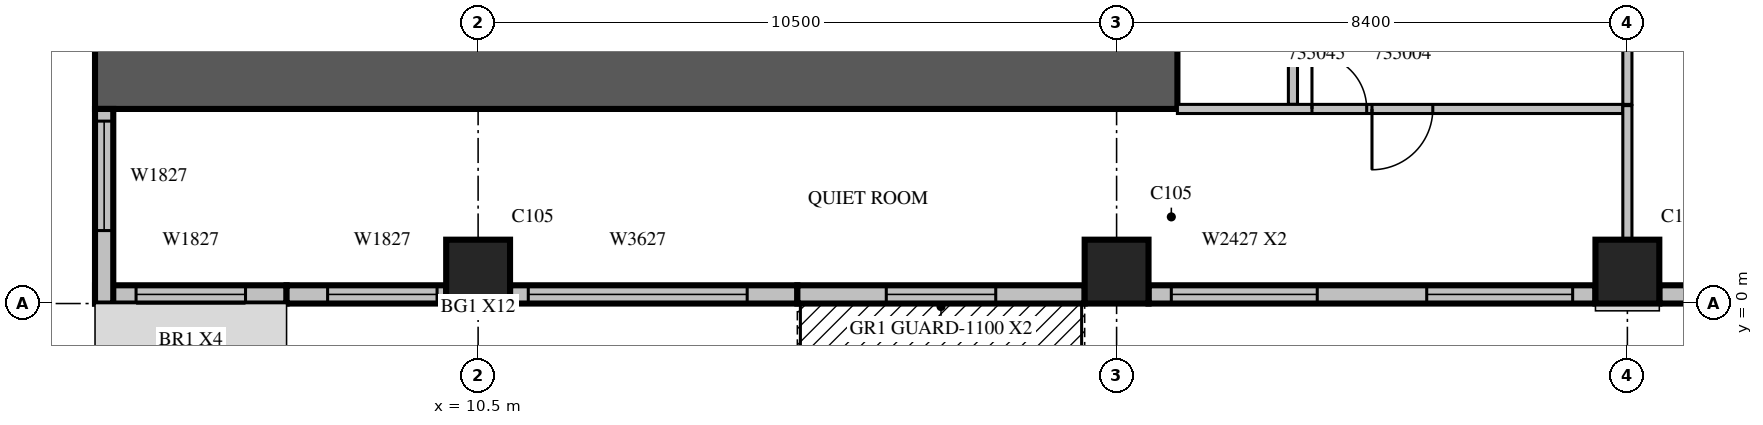
"""IFC4 building model, lengths in metres.
Left out: names, types, materials, properties, quantities, classifications, styles, units other than length and angle.
Written with IfcOpenShell. Run it as: python <this file> out.ifc"""

import sys

from ifc_helpers import new_model, si_unit, direction, frame, frame_2d, origin, origin_2d, place, context, subcontext, project, spatial, rectangle, extrude, source, transform, mapped, element, fill, save


model = new_model("IFC4")
c1 = context("Model", 3, precision=1e-05, world=origin(), true_north=direction((0.0, 1.0)))
c2 = subcontext(c1, "Body", "Model", "MODEL_VIEW")
j1 = project(units=[si_unit("LENGTHUNIT", "METRE"), si_unit("PLANEANGLEUNIT", "RADIAN")], contexts=[c1])
p1 = place(None, origin())
s1 = spatial("IfcSite", under=j1, at=p1, CompositionType="ELEMENT")
p2 = place(p1, origin())
s2 = spatial("IfcBuilding", under=s1, at=p2, CompositionType="ELEMENT")
p3 = place(p2, frame((0.0, 0.0, 158.1)))
s3 = spatial("IfcBuildingStorey", under=s2, at=p3, CompositionType="ELEMENT", Elevation=158.1)
m1 = source(origin(), c2, "Body", "SweptSolid", [
    extrude(rectangle(XDim=1.05, YDim=1.05, at=origin_2d()), origin(), (0.0, 0.0, 1.0), 4.2),
])
for number, where, z_axis, x_axis in (
    (1, (10.5, 0.525, 0.0), (0.0, 0.0, 1.0), (1.0, 0.0, 0.0)),
    (2, (21.0, 0.525, 0.0), (0.0, 0.0, 1.0), (1.0, 0.0, 0.0)),
    (3, (29.4, 0.525, 0.0), (0.0, 0.0, 1.0), (1.0, 0.0, 0.0)),
):
    element("IfcColumn", number, at=place(p3, frame(where, z_axis=z_axis, x_axis=x_axis)), inside=s3, PredefinedType="COLUMN", context=c2, shape_type="MappedRepresentation", body=[
        mapped(m1, transform((0.0, 0.0, 0.0), scale=1.0)),
    ])
m2 = source(origin(), c2, "Body", "SweptSolid", [
    extrude(rectangle(XDim=17.8, YDim=1.0, at=frame_2d((8.9, 0.0))), origin(), (0.0, 0.0, 1.0), 4.2),
])
p4 = place(p3, frame((4.2, 3.7, 0.0), z_axis=(0.0, 0.0, 1.0), x_axis=(1.0, 0.0, 0.0)))
e4 = element("IfcWall", 4, at=p4, inside=s3, PredefinedType="SHEAR", context=c2, shape_type="MappedRepresentation", body=[
    mapped(m2, transform((0.0, 0.0, 0.0), scale=1.0)),
])
m3 = source(origin(), c2, "Body", "SweptSolid", [
    extrude(rectangle(XDim=3.15, YDim=0.3, at=frame_2d((1.575, 0.0))), origin(), (0.0, 0.0, 1.0), 3.8),
])
p5 = place(p3, frame((4.2, 0.15, 0.0), z_axis=(0.0, 0.0, 1.0), x_axis=(1.0, 0.0, 0.0)))
e5 = element("IfcWall", 5, at=p5, inside=s3, PredefinedType="STANDARD", context=c2, shape_type="MappedRepresentation", body=[
    mapped(m3, transform((0.0, 0.0, 0.0), scale=1.0)),
])
m4 = source(origin(), c2, "Body", "SweptSolid", [
    extrude(rectangle(XDim=1.8, YDim=2.7, at=frame_2d((0.9, 1.35))), frame((0.0, 0.16, 0.0), z_axis=(0.0, -1.0, 0.0), x_axis=(1.0, 0.0, 0.0)), (0.0, 0.0, 1.0), 0.32),
])
p6 = place(p5, frame((0.675, 0.0, 0.6)))
e6 = element("IfcOpeningElement", 6, at=p6, cuts=e5, PredefinedType="OPENING", context=c2, shape_type="MappedRepresentation", body=[
    mapped(m4, transform((0.0, 0.0, 0.0), scale=1.0)),
])
m5 = source(origin(), c2, "Body", "SweptSolid", [
    extrude(rectangle(XDim=2.625, YDim=0.3, at=frame_2d((1.312, 0.0))), origin(), (0.0, 0.0, 1.0), 3.8),
])
p7 = place(p3, frame((7.35, 0.15, 0.0), z_axis=(0.0, 0.0, 1.0), x_axis=(1.0, 0.0, 0.0)))
e7 = element("IfcWall", 7, at=p7, inside=s3, PredefinedType="STANDARD", context=c2, shape_type="MappedRepresentation", body=[
    mapped(m5, transform((0.0, 0.0, 0.0), scale=1.0)),
])
p8 = place(p7, frame((0.675, 0.0, 0.6)))
e8 = element("IfcOpeningElement", 8, at=p8, cuts=e7, PredefinedType="OPENING", context=c2, shape_type="MappedRepresentation", body=[
    mapped(m4, transform((0.0, 0.0, 0.0), scale=1.0)),
])
m6 = source(origin(), c2, "Body", "SweptSolid", [
    extrude(rectangle(XDim=4.725, YDim=0.3, at=frame_2d((2.362, 0.0))), origin(), (0.0, 0.0, 1.0), 3.8),
])
p9 = place(p3, frame((11.025, 0.15, 0.0), z_axis=(0.0, 0.0, 1.0), x_axis=(1.0, 0.0, 0.0)))
e9 = element("IfcWall", 9, at=p9, inside=s3, PredefinedType="STANDARD", context=c2, shape_type="MappedRepresentation", body=[
    mapped(m6, transform((0.0, 0.0, 0.0), scale=1.0)),
])
m7 = source(origin(), c2, "Body", "SweptSolid", [
    extrude(rectangle(XDim=3.6, YDim=2.7, at=frame_2d((1.8, 1.35))), frame((0.0, 0.16, 0.0), z_axis=(0.0, -1.0, 0.0), x_axis=(1.0, 0.0, 0.0)), (0.0, 0.0, 1.0), 0.32),
])
p10 = place(p9, frame((0.3, 0.0, 0.6)))
e10 = element("IfcOpeningElement", 10, at=p10, cuts=e9, PredefinedType="OPENING", context=c2, shape_type="MappedRepresentation", body=[
    mapped(m7, transform((0.0, 0.0, 0.0), scale=1.0)),
])
p11 = place(p3, frame((15.75, 0.15, 0.0), z_axis=(0.0, 0.0, 1.0), x_axis=(1.0, 0.0, 0.0)))
e11 = element("IfcWall", 11, at=p11, inside=s3, PredefinedType="STANDARD", context=c2, shape_type="MappedRepresentation", body=[
    mapped(m6, transform((0.0, 0.0, 0.0), scale=1.0)),
])
m8 = source(origin(), c2, "Body", "SweptSolid", [
    extrude(rectangle(XDim=1.8, YDim=2.4, at=frame_2d((0.9, 1.2))), frame((0.0, 0.16, 0.0), z_axis=(0.0, -1.0, 0.0), x_axis=(1.0, 0.0, 0.0)), (0.0, 0.0, 1.0), 0.32),
])
p12 = place(p11, frame((1.462, 0.0, 0.0)))
e12 = element("IfcOpeningElement", 12, at=p12, cuts=e11, PredefinedType="OPENING", context=c2, shape_type="MappedRepresentation", body=[
    mapped(m8, transform((0.0, 0.0, 0.0), scale=1.0)),
])
m9 = source(origin(), c2, "Body", "SweptSolid", [
    extrude(rectangle(XDim=7.35, YDim=0.3, at=frame_2d((3.675, 0.0))), origin(), (0.0, 0.0, 1.0), 3.8),
])
p13 = place(p3, frame((21.525, 0.15, 0.0), z_axis=(0.0, 0.0, 1.0), x_axis=(1.0, 0.0, 0.0)))
e13 = element("IfcWall", 13, at=p13, inside=s3, PredefinedType="STANDARD", context=c2, shape_type="MappedRepresentation", body=[
    mapped(m9, transform((0.0, 0.0, 0.0), scale=1.0)),
])
m10 = source(origin(), c2, "Body", "SweptSolid", [
    extrude(rectangle(XDim=2.4, YDim=2.7, at=frame_2d((1.2, 1.35))), frame((0.0, 0.16, 0.0), z_axis=(0.0, -1.0, 0.0), x_axis=(1.0, 0.0, 0.0)), (0.0, 0.0, 1.0), 0.32),
])
p14 = place(p13, frame((0.375, 0.0, 0.6)))
e14 = element("IfcOpeningElement", 14, at=p14, cuts=e13, PredefinedType="OPENING", context=c2, shape_type="MappedRepresentation", body=[
    mapped(m10, transform((0.0, 0.0, 0.0), scale=1.0)),
])
p15 = place(p13, frame((4.575, 0.0, 0.6)))
e15 = element("IfcOpeningElement", 15, at=p15, cuts=e13, PredefinedType="OPENING", context=c2, shape_type="MappedRepresentation", body=[
    mapped(m10, transform((0.0, 0.0, 0.0), scale=1.0)),
])
p16 = place(p3, frame((29.925, 0.15, 0.0), z_axis=(0.0, 0.0, 1.0), x_axis=(1.0, 0.0, 0.0)))
e16 = element("IfcWall", 16, at=p16, inside=s3, PredefinedType="STANDARD", context=c2, shape_type="MappedRepresentation", body=[
    mapped(m9, transform((0.0, 0.0, 0.0), scale=1.0)),
])
p17 = place(p16, frame((2.575, 0.0, 0.6)))
e17 = element("IfcOpeningElement", 17, at=p17, cuts=e16, PredefinedType="OPENING", context=c2, shape_type="MappedRepresentation", body=[
    mapped(m10, transform((0.0, 0.0, 0.0), scale=1.0)),
])
m11 = source(origin(), c2, "Body", "SweptSolid", [
    extrude(rectangle(XDim=3.2, YDim=0.3, at=frame_2d((1.6, 0.0))), origin(), (0.0, 0.0, 1.0), 3.8),
])
p18 = place(p3, frame((4.35, 3.2, 0.0), z_axis=(0.0, 0.0, 1.0), x_axis=(0.0, -1.0, 0.0)))
e18 = element("IfcWall", 18, at=p18, inside=s3, PredefinedType="STANDARD", context=c2, shape_type="MappedRepresentation", body=[
    mapped(m11, transform((0.0, 0.0, 0.0), scale=1.0)),
])
p19 = place(p18, frame((0.2, 0.0, 0.6)))
e19 = element("IfcOpeningElement", 19, at=p19, cuts=e18, PredefinedType="OPENING", context=c2, shape_type="MappedRepresentation", body=[
    mapped(m4, transform((0.0, 0.0, 0.0), scale=1.0)),
])
m12 = source(origin(), c2, "Body", "SweptSolid", [
    extrude(rectangle(XDim=11.425, YDim=0.15, at=frame_2d((5.713, 0.0))), origin(), (0.0, 0.0, 1.0), 3.8),
])
p20 = place(p3, frame((23.9, 14.7, 0.0), z_axis=(0.0, 0.0, 1.0), x_axis=(0.0, -1.0, 0.0)))
e20 = element("IfcWall", 20, at=p20, inside=s3, PredefinedType="PARTITIONING", context=c2, shape_type="MappedRepresentation", body=[
    mapped(m12, transform((0.0, 0.0, 0.0), scale=1.0)),
])
m13 = source(origin(), c2, "Body", "SweptSolid", [
    extrude(rectangle(XDim=0.9, YDim=2.1, at=frame_2d((0.45, 1.05))), frame((0.0, 0.085, 0.0), z_axis=(0.0, -1.0, 0.0), x_axis=(1.0, 0.0, 0.0)), (0.0, 0.0, 1.0), 0.17),
])
p21 = place(p20, frame((7.963, 0.0, 0.0)))
e21 = element("IfcOpeningElement", 21, at=p21, cuts=e20, PredefinedType="OPENING", context=c2, shape_type="MappedRepresentation", body=[
    mapped(m13, transform((0.0, 0.0, 0.0), scale=1.0)),
])
p22 = place(p20, frame((1.375, 0.0, 0.0)))
e22 = element("IfcOpeningElement", 22, at=p22, cuts=e20, PredefinedType="OPENING", context=c2, shape_type="MappedRepresentation", body=[
    mapped(m13, transform((0.0, 0.0, 0.0), scale=1.0)),
])
m14 = source(origin(), c2, "Body", "SweptSolid", [
    extrude(rectangle(XDim=6.701, YDim=0.15, at=frame_2d((3.35, 0.0))), origin(), (0.0, 0.0, 1.0), 3.8),
])
p23 = place(p3, frame((29.4, 3.275, 0.0), z_axis=(0.0, 0.0, 1.0), x_axis=(0.0, 1.0, 0.0)))
e23 = element("IfcWall", 23, at=p23, inside=s3, PredefinedType="PARTITIONING", context=c2, shape_type="MappedRepresentation", body=[
    mapped(m14, transform((0.0, 0.0, 0.0), scale=1.0)),
])
m15 = source(origin(), c2, "Body", "SweptSolid", [
    extrude(rectangle(XDim=7.325, YDim=0.15, at=frame_2d((3.663, 0.0))), origin(), (0.0, 0.0, 1.0), 3.8),
])
p24 = place(p3, frame((22.0, 3.2, 0.0), z_axis=(0.0, 0.0, 1.0), x_axis=(1.0, 0.0, 0.0)))
e24 = element("IfcWall", 24, at=p24, inside=s3, PredefinedType="PARTITIONING", context=c2, shape_type="MappedRepresentation", body=[
    mapped(m15, transform((0.0, 0.0, 0.0), scale=1.0)),
])
m16 = source(origin(), c2, "Body", "SweptSolid", [
    extrude(rectangle(XDim=1.0, YDim=2.1, at=frame_2d((0.5, 1.05))), frame((0.0, 0.085, 0.0), z_axis=(0.0, -1.0, 0.0), x_axis=(1.0, 0.0, 0.0)), (0.0, 0.0, 1.0), 0.17),
])
p25 = place(p24, frame((3.2, 0.0, 0.0)))
e25 = element("IfcOpeningElement", 25, at=p25, cuts=e24, PredefinedType="OPENING", context=c2, shape_type="MappedRepresentation", body=[
    mapped(m16, transform((0.0, 0.0, 0.0), scale=1.0)),
])
p26 = place(p24, frame((2.213, 0.0, 0.0)))
e26 = element("IfcOpeningElement", 26, at=p26, cuts=e24, PredefinedType="OPENING", context=c2, shape_type="MappedRepresentation", body=[
    mapped(m13, transform((0.0, 0.0, 0.0), scale=1.0)),
])
m17 = source(origin(), c2, "Body", "SweptSolid", [
    extrude(rectangle(XDim=2.206, YDim=0.15, at=frame_2d((1.103, 0.0))), origin(), (0.0, 0.0, 1.0), 3.8),
])
p27 = place(p3, frame((29.4, 1.049, 0.0), z_axis=(0.0, 0.0, 1.0), x_axis=(0.0, 1.0, 0.0)))
e27 = element("IfcWall", 27, at=p27, inside=s3, PredefinedType="PARTITIONING", context=c2, shape_type="MappedRepresentation", body=[
    mapped(m17, transform((0.0, 0.0, 0.0), scale=1.0)),
])
m18 = source(origin(), c2, "Body", "SweptSolid", [
    extrude(rectangle(XDim=1.8, YDim=2.7, at=frame_2d((0.9, 1.35))), frame((0.0, 0.03, 0.0), z_axis=(0.0, -1.0, 0.0), x_axis=(1.0, 0.0, 0.0)), (0.0, 0.0, 1.0), 0.06),
])
p28 = place(p6, origin())
e28 = element("IfcWindow", 28, at=p28, inside=s3, PartitioningType="SINGLE_PANEL", PredefinedType="WINDOW", context=c2, shape_type="MappedRepresentation", body=[
    mapped(m18, transform((0.0, 0.0, 0.0), scale=1.0)),
])
fill(e6, e28)
p29 = place(p8, origin())
e29 = element("IfcWindow", 29, at=p29, inside=s3, PartitioningType="SINGLE_PANEL", PredefinedType="WINDOW", context=c2, shape_type="MappedRepresentation", body=[
    mapped(m18, transform((0.0, 0.0, 0.0), scale=1.0)),
])
fill(e8, e29)
m19 = source(origin(), c2, "Body", "SweptSolid", [
    extrude(rectangle(XDim=3.6, YDim=2.7, at=frame_2d((1.8, 1.35))), frame((0.0, 0.03, 0.0), z_axis=(0.0, -1.0, 0.0), x_axis=(1.0, 0.0, 0.0)), (0.0, 0.0, 1.0), 0.06),
])
p30 = place(p10, origin())
e30 = element("IfcWindow", 30, at=p30, inside=s3, PartitioningType="SINGLE_PANEL", PredefinedType="WINDOW", context=c2, shape_type="MappedRepresentation", body=[
    mapped(m19, transform((0.0, 0.0, 0.0), scale=1.0)),
])
fill(e10, e30)
m20 = source(origin(), c2, "Body", "SweptSolid", [
    extrude(rectangle(XDim=1.8, YDim=2.4, at=frame_2d((0.9, 1.2))), frame((0.0, 0.025, 0.0), z_axis=(0.0, -1.0, 0.0), x_axis=(1.0, 0.0, 0.0)), (0.0, 0.0, 1.0), 0.05),
])
p31 = place(p12, origin())
e31 = element("IfcDoor", 31, at=p31, inside=s3, OperationType="SLIDING_TO_LEFT", PredefinedType="DOOR", context=c2, shape_type="MappedRepresentation", body=[
    mapped(m20, transform((0.0, 0.0, 0.0), scale=1.0)),
])
fill(e12, e31)
m21 = source(origin(), c2, "Body", "SweptSolid", [
    extrude(rectangle(XDim=2.4, YDim=2.7, at=frame_2d((1.2, 1.35))), frame((0.0, 0.03, 0.0), z_axis=(0.0, -1.0, 0.0), x_axis=(1.0, 0.0, 0.0)), (0.0, 0.0, 1.0), 0.06),
])
p32 = place(p14, origin())
e32 = element("IfcWindow", 32, at=p32, inside=s3, PartitioningType="SINGLE_PANEL", PredefinedType="WINDOW", context=c2, shape_type="MappedRepresentation", body=[
    mapped(m21, transform((0.0, 0.0, 0.0), scale=1.0)),
])
fill(e14, e32)
p33 = place(p15, origin())
e33 = element("IfcWindow", 33, at=p33, inside=s3, PartitioningType="SINGLE_PANEL", PredefinedType="WINDOW", context=c2, shape_type="MappedRepresentation", body=[
    mapped(m21, transform((0.0, 0.0, 0.0), scale=1.0)),
])
fill(e15, e33)
p34 = place(p19, origin())
e34 = element("IfcWindow", 34, at=p34, inside=s3, PartitioningType="SINGLE_PANEL", PredefinedType="WINDOW", context=c2, shape_type="MappedRepresentation", body=[
    mapped(m18, transform((0.0, 0.0, 0.0), scale=1.0)),
])
fill(e19, e34)
m22 = source(origin(), c2, "Body", "SweptSolid", [
    extrude(rectangle(XDim=1.0, YDim=2.1, at=frame_2d((0.5, 1.05))), frame((0.0, 0.025, 0.0), z_axis=(0.0, -1.0, 0.0), x_axis=(1.0, 0.0, 0.0)), (0.0, 0.0, 1.0), 0.05),
])
p35 = place(p25, origin())
e35 = element("IfcDoor", 35, at=p35, inside=s3, OperationType="SINGLE_SWING_RIGHT", PredefinedType="DOOR", context=c2, shape_type="MappedRepresentation", body=[
    mapped(m22, transform((0.0, 0.0, 0.0), scale=1.0)),
])
fill(e25, e35)
m23 = source(origin(), c2, "Body", "SweptSolid", [
    extrude(rectangle(XDim=0.9, YDim=2.1, at=frame_2d((0.45, 1.05))), frame((0.0, 0.025, 0.0), z_axis=(0.0, -1.0, 0.0), x_axis=(1.0, 0.0, 0.0)), (0.0, 0.0, 1.0), 0.05),
])
p36 = place(p26, origin())
e36 = element("IfcDoor", 36, at=p36, inside=s3, OperationType="SINGLE_SWING_LEFT", PredefinedType="DOOR", context=c2, shape_type="MappedRepresentation", body=[
    mapped(m23, transform((0.0, 0.0, 0.0), scale=1.0)),
])
fill(e26, e36)
save(model, sys.argv[1])
